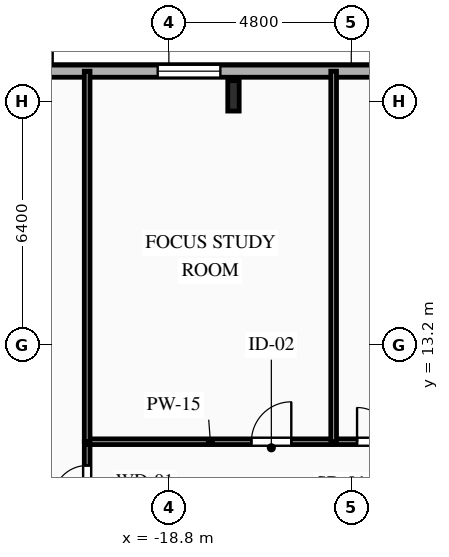
"""IFC4 building model, lengths in metres.
Left out: names, types, materials, properties, quantities, classifications, styles, units other than length and angle.
Written with IfcOpenShell. Run it as: python <this file> out.ifc"""

import sys

from ifc_helpers import new_model, si_unit, direction, frame, frame_2d, origin, origin_2d, place, context, subcontext, project, spatial, rectangle, i_section, extrude, element, fill, save


model = new_model("IFC4")
c1 = context("Model", 3, precision=1e-05, world=origin(), true_north=direction((0.0, 1.0)))
c2 = subcontext(c1, "Body", "Model", "MODEL_VIEW")
j1 = project(units=[si_unit("LENGTHUNIT", "METRE"), si_unit("PLANEANGLEUNIT", "RADIAN")], contexts=[c1])
p1 = place(None, origin())
s1 = spatial("IfcSite", under=j1, at=p1, CompositionType="ELEMENT")
p2 = place(p1, origin())
s2 = spatial("IfcBuilding", under=s1, at=p2, CompositionType="ELEMENT")
p3 = place(p2, frame((0.0, 0.0, 134.35)))
s3 = spatial("IfcBuildingStorey", under=s2, at=p3, CompositionType="ELEMENT", Elevation=134.35)
p4 = place(p3, frame((-17.1, 19.75, 0.0), z_axis=(0.0, 0.0, 1.0), x_axis=(1.0, 0.0, 0.0)))
e1 = element("IfcColumn", 1, at=p4, inside=s3, PredefinedType="COLUMN", context=c2, shape_type="SweptSolid", body=[
    extrude(i_section(OverallWidth=0.3, OverallDepth=0.8, WebThickness=0.018, FlangeThickness=0.033, FilletRadius=0.03, at=origin_2d()), origin(), (0.0, 0.0, 1.0), 3.35),
])
p5 = place(p3, frame((-25.8, 20.4, 0.0), z_axis=(0.0, 0.0, 1.0), x_axis=(1.0, 0.0, 0.0)))
e2 = element("IfcWall", 2, at=p5, inside=s3, PredefinedType="SOLIDWALL", context=c2, shape_type="SweptSolid", body=[
    extrude(rectangle(XDim=49.6, YDim=0.32, at=frame_2d((24.8, 0.0))), origin(), (0.0, 0.0, 1.0), 3.04),
])
p6 = place(p5, frame((2.135, 0.0, 0.85)))
e3 = element("IfcOpeningElement", 3, at=p6, cuts=e2, PredefinedType="OPENING", context=c2, shape_type="SweptSolid", body=[
    extrude(rectangle(XDim=1.65, YDim=1.85, at=frame_2d((0.825, 0.925))), frame((0.0, 0.17, 0.0), z_axis=(0.0, -1.0, 0.0), x_axis=(1.0, 0.0, 0.0)), (0.0, 0.0, 1.0), 0.34),
])
p7 = place(p5, frame((6.706, 0.0, 0.85)))
e4 = element("IfcOpeningElement", 4, at=p7, cuts=e2, PredefinedType="OPENING", context=c2, shape_type="SweptSolid", body=[
    extrude(rectangle(XDim=1.65, YDim=1.85, at=frame_2d((0.825, 0.925))), frame((0.0, 0.17, 0.0), z_axis=(0.0, -1.0, 0.0), x_axis=(1.0, 0.0, 0.0)), (0.0, 0.0, 1.0), 0.34),
])
p8 = place(p5, frame((14.76, 0.0, 0.85)))
e5 = element("IfcOpeningElement", 5, at=p8, cuts=e2, PredefinedType="OPENING", context=c2, shape_type="SweptSolid", body=[
    extrude(rectangle(XDim=1.6, YDim=1.85, at=frame_2d((0.8, 0.925))), frame((0.0, 0.17, 0.0), z_axis=(0.0, -1.0, 0.0), x_axis=(1.0, 0.0, 0.0)), (0.0, 0.0, 1.0), 0.34),
])
p9 = place(p5, frame((19.26, 0.0, 0.85)))
e6 = element("IfcOpeningElement", 6, at=p9, cuts=e2, PredefinedType="OPENING", context=c2, shape_type="SweptSolid", body=[
    extrude(rectangle(XDim=2.2, YDim=1.85, at=frame_2d((1.1, 0.925))), frame((0.0, 0.17, 0.0), z_axis=(0.0, -1.0, 0.0), x_axis=(1.0, 0.0, 0.0)), (0.0, 0.0, 1.0), 0.34),
])
p10 = place(p5, frame((25.26, 0.0, 0.85)))
e7 = element("IfcOpeningElement", 7, at=p10, cuts=e2, PredefinedType="OPENING", context=c2, shape_type="SweptSolid", body=[
    extrude(rectangle(XDim=2.2, YDim=1.85, at=frame_2d((1.1, 0.925))), frame((0.0, 0.17, 0.0), z_axis=(0.0, -1.0, 0.0), x_axis=(1.0, 0.0, 0.0)), (0.0, 0.0, 1.0), 0.34),
])
p11 = place(p5, frame((30.4, 0.0, 0.85)))
e8 = element("IfcOpeningElement", 8, at=p11, cuts=e2, PredefinedType="OPENING", context=c2, shape_type="SweptSolid", body=[
    extrude(rectangle(XDim=2.2, YDim=1.85, at=frame_2d((1.1, 0.925))), frame((0.0, 0.17, 0.0), z_axis=(0.0, -1.0, 0.0), x_axis=(1.0, 0.0, 0.0)), (0.0, 0.0, 1.0), 0.34),
])
p12 = place(p5, frame((37.18, 0.0, 0.85)))
e9 = element("IfcOpeningElement", 9, at=p12, cuts=e2, PredefinedType="OPENING", context=c2, shape_type="SweptSolid", body=[
    extrude(rectangle(XDim=2.2, YDim=1.85, at=frame_2d((1.1, 0.925))), frame((0.0, 0.17, 0.0), z_axis=(0.0, -1.0, 0.0), x_axis=(1.0, 0.0, 0.0)), (0.0, 0.0, 1.0), 0.34),
])
p13 = place(p5, frame((43.215, 0.0, 0.85)))
e10 = element("IfcOpeningElement", 10, at=p13, cuts=e2, PredefinedType="OPENING", context=c2, shape_type="SweptSolid", body=[
    extrude(rectangle(XDim=1.65, YDim=1.85, at=frame_2d((0.825, 0.925))), frame((0.0, 0.17, 0.0), z_axis=(0.0, -1.0, 0.0), x_axis=(1.0, 0.0, 0.0)), (0.0, 0.0, 1.0), 0.34),
])
p14 = place(p5, frame((47.45, 0.0, 0.85)))
e11 = element("IfcOpeningElement", 11, at=p14, cuts=e2, PredefinedType="OPENING", context=c2, shape_type="SweptSolid", body=[
    extrude(rectangle(XDim=1.1, YDim=1.85, at=frame_2d((0.55, 0.925))), frame((0.0, 0.17, 0.0), z_axis=(0.0, -1.0, 0.0), x_axis=(1.0, 0.0, 0.0)), (0.0, 0.0, 1.0), 0.34),
])
p15 = place(p3, frame((-20.95, 8.5, 0.0), z_axis=(0.0, 0.0, 1.0), x_axis=(0.0, 1.0, 0.0)))
e12 = element("IfcWall", 12, at=p15, inside=s3, PredefinedType="PARTITIONING", context=c2, shape_type="SweptSolid", body=[
    extrude(rectangle(XDim=2.15, YDim=0.15, at=frame_2d((1.075, 0.0))), origin(), (0.0, 0.0, 1.0), 3.04),
])
p16 = place(p15, frame((0.625, 0.0, 0.0)))
e13 = element("IfcOpeningElement", 13, at=p16, cuts=e12, PredefinedType="OPENING", context=c2, shape_type="SweptSolid", body=[
    extrude(rectangle(XDim=0.9, YDim=2.1, at=frame_2d((0.45, 1.05))), frame((0.0, 0.085, 0.0), z_axis=(0.0, -1.0, 0.0), x_axis=(1.0, 0.0, 0.0)), (0.0, 0.0, 1.0), 0.17),
])
p17 = place(p3, frame((-20.95, 10.65, 0.0), z_axis=(0.0, 0.0, 1.0), x_axis=(1.0, 0.0, 0.0)))
e14 = element("IfcWall", 14, at=p17, inside=s3, PredefinedType="PARTITIONING", context=c2, shape_type="SweptSolid", body=[
    extrude(rectangle(XDim=6.486, YDim=0.15, at=frame_2d((3.243, 0.0))), origin(), (0.0, 0.0, 1.0), 3.04),
])
p18 = place(p17, frame((4.322, 0.0, 0.0)))
e15 = element("IfcOpeningElement", 15, at=p18, cuts=e14, PredefinedType="OPENING", context=c2, shape_type="SweptSolid", body=[
    extrude(rectangle(XDim=1.05, YDim=2.15, at=frame_2d((0.525, 1.075))), frame((0.0, 0.085, 0.0), z_axis=(0.0, -1.0, 0.0), x_axis=(1.0, 0.0, 0.0)), (0.0, 0.0, 1.0), 0.17),
])
p19 = place(p3, frame((-14.464, 10.65, 0.0), z_axis=(0.0, 0.0, 1.0), x_axis=(1.0, 0.0, 0.0)))
e16 = element("IfcWall", 16, at=p19, inside=s3, PredefinedType="PLUMBINGWALL", context=c2, shape_type="SweptSolid", body=[
    extrude(rectangle(XDim=2.35, YDim=0.15, at=frame_2d((1.175, 0.0))), origin(), (0.0, 0.0, 1.0), 3.04),
])
p20 = place(p19, frame((0.616, 0.0, 0.0)))
e17 = element("IfcOpeningElement", 17, at=p20, cuts=e16, PredefinedType="OPENING", context=c2, shape_type="SweptSolid", body=[
    extrude(rectangle(XDim=0.9, YDim=2.1, at=frame_2d((0.45, 1.05))), frame((0.0, 0.085, 0.0), z_axis=(0.0, -1.0, 0.0), x_axis=(1.0, 0.0, 0.0)), (0.0, 0.0, 1.0), 0.17),
])
p21 = place(p3, frame((-20.95, 20.4, 0.0), z_axis=(0.0, 0.0, 1.0), x_axis=(0.0, -1.0, 0.0)))
e18 = element("IfcWall", 18, at=p21, inside=s3, PredefinedType="PARTITIONING", context=c2, shape_type="SweptSolid", body=[
    extrude(rectangle(XDim=9.75, YDim=0.15, at=frame_2d((4.875, 0.0))), origin(), (0.0, 0.0, 1.0), 3.04),
])
p22 = place(p3, frame((-14.464, 20.4, 0.0), z_axis=(0.0, 0.0, 1.0), x_axis=(0.0, -1.0, 0.0)))
e19 = element("IfcWall", 19, at=p22, inside=s3, PredefinedType="PLUMBINGWALL", context=c2, shape_type="SweptSolid", body=[
    extrude(rectangle(XDim=9.75, YDim=0.15, at=frame_2d((4.875, 0.0))), origin(), (0.0, 0.0, 1.0), 3.04),
])
p23 = place(p7, origin())
e20 = element("IfcWindow", 20, at=p23, inside=s3, PartitioningType="SINGLE_PANEL", PredefinedType="WINDOW", context=c2, shape_type="SweptSolid", body=[
    extrude(rectangle(XDim=1.65, YDim=1.85, at=frame_2d((0.825, 0.925))), frame((0.0, 0.03, 0.0), z_axis=(0.0, -1.0, 0.0), x_axis=(1.0, 0.0, 0.0)), (0.0, 0.0, 1.0), 0.06),
])
fill(e4, e20)
p24 = place(p16, origin())
e21 = element("IfcDoor", 21, at=p24, inside=s3, OperationType="SINGLE_SWING_LEFT", PredefinedType="DOOR", context=c2, shape_type="SweptSolid", body=[
    extrude(rectangle(XDim=0.9, YDim=2.1, at=frame_2d((0.45, 1.05))), frame((0.0, 0.025, 0.0), z_axis=(0.0, -1.0, 0.0), x_axis=(1.0, 0.0, 0.0)), (0.0, 0.0, 1.0), 0.05),
])
fill(e13, e21)
p25 = place(p18, origin())
e22 = element("IfcDoor", 22, at=p25, inside=s3, OperationType="SINGLE_SWING_RIGHT", PredefinedType="DOOR", context=c2, shape_type="SweptSolid", body=[
    extrude(rectangle(XDim=1.05, YDim=2.15, at=frame_2d((0.525, 1.075))), frame((0.0, 0.025, 0.0), z_axis=(0.0, -1.0, 0.0), x_axis=(1.0, 0.0, 0.0)), (0.0, 0.0, 1.0), 0.05),
])
fill(e15, e22)
p26 = place(p20, origin())
e23 = element("IfcDoor", 23, at=p26, inside=s3, OperationType="SINGLE_SWING_LEFT", PredefinedType="DOOR", context=c2, shape_type="SweptSolid", body=[
    extrude(rectangle(XDim=0.9, YDim=2.1, at=frame_2d((0.45, 1.05))), frame((0.0, 0.025, 0.0), z_axis=(0.0, -1.0, 0.0), x_axis=(1.0, 0.0, 0.0)), (0.0, 0.0, 1.0), 0.05),
])
fill(e17, e23)
save(model, sys.argv[1])
